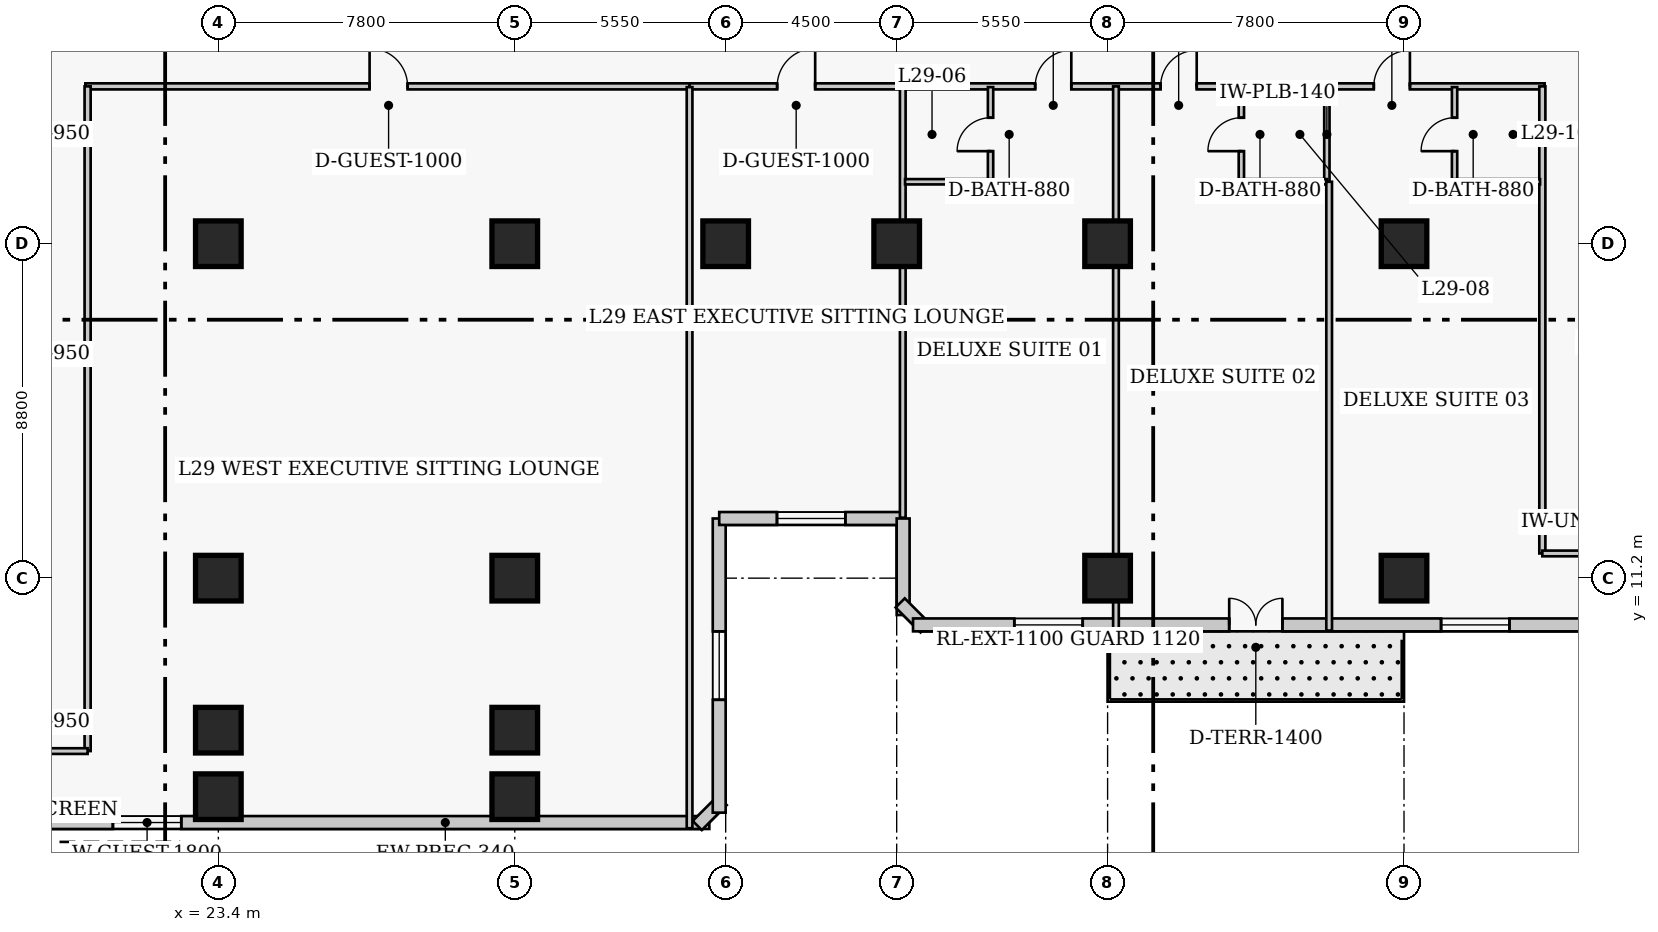
"""IFC4 building model, lengths in metres.
Left out: names, types, materials, properties, quantities, classifications, styles, units other than length and angle.
Written with IfcOpenShell. Run it as: python <this file> out.ifc"""

import sys

from ifc_helpers import new_model, si_unit, direction, frame, frame_2d, origin, origin_2d, place, context, subcontext, project, spatial, rectangle, extrude, element, fill, save


model = new_model("IFC4")
c1 = context("Model", 3, precision=1e-05, world=origin(), true_north=direction((0.0, 1.0)))
c2 = subcontext(c1, "Body", "Model", "MODEL_VIEW")
j1 = project(units=[si_unit("LENGTHUNIT", "METRE"), si_unit("PLANEANGLEUNIT", "RADIAN")], contexts=[c1])
p1 = place(None, origin())
s1 = spatial("IfcSite", under=j1, at=p1, CompositionType="ELEMENT")
p2 = place(p1, origin())
s2 = spatial("IfcBuilding", under=s1, at=p2, CompositionType="ELEMENT")
p3 = place(p2, frame((0.0, 0.0, 118.4)))
s3 = spatial("IfcBuildingStorey", under=s2, at=p3, CompositionType="ELEMENT", Elevation=118.4)
for number, where, z_axis, x_axis in (
    (1, (23.4, 11.2, 0.0), (0.0, 0.0, 1.0), (1.0, 0.0, 0.0)),
    (2, (23.4, 20.0, 0.0), (0.0, 0.0, 1.0), (1.0, 0.0, 0.0)),
    (3, (31.2, 11.2, 0.0), (0.0, 0.0, 1.0), (1.0, 0.0, 0.0)),
    (4, (31.2, 20.0, 0.0), (0.0, 0.0, 1.0), (1.0, 0.0, 0.0)),
    (5, (36.75, 20.0, 0.0), (0.0, 0.0, 1.0), (1.0, 0.0, 0.0)),
    (6, (41.25, 20.0, 0.0), (0.0, 0.0, 1.0), (1.0, 0.0, 0.0)),
    (7, (46.8, 11.2, 0.0), (0.0, 0.0, 1.0), (1.0, 0.0, 0.0)),
    (8, (46.8, 20.0, 0.0), (0.0, 0.0, 1.0), (1.0, 0.0, 0.0)),
    (9, (54.6, 11.2, 0.0), (0.0, 0.0, 1.0), (1.0, 0.0, 0.0)),
    (10, (54.6, 20.0, 0.0), (0.0, 0.0, 1.0), (1.0, 0.0, 0.0)),
    (11, (23.4, 7.2, 0.0), (0.0, 0.0, 1.0), (1.0, 0.0, 0.0)),
    (12, (31.2, 7.2, 0.0), (0.0, 0.0, 1.0), (1.0, 0.0, 0.0)),
    (13, (23.4, 5.45, 0.0), (0.0, 0.0, 1.0), (1.0, 0.0, 0.0)),
    (14, (31.2, 5.45, 0.0), (0.0, 0.0, 1.0), (1.0, 0.0, 0.0)),
):
    element("IfcColumn", number, at=place(p3, frame(where, z_axis=z_axis, x_axis=x_axis)), inside=s3, PredefinedType="COLUMN", context=c2, shape_type="SweptSolid", body=[
        extrude(rectangle(XDim=1.2, YDim=1.2, at=origin_2d()), origin(), (0.0, 0.0, 1.0), 3.8),
    ])
p4 = place(p3, frame((8.03, 4.77, 0.0), z_axis=(0.0, 0.0, 1.0), x_axis=(1.0, 0.0, 0.0)))
e15 = element("IfcWall", 15, at=p4, inside=s3, PredefinedType="SOLIDWALL", context=c2, shape_type="SweptSolid", body=[
    extrude(rectangle(XDim=28.29, YDim=0.34, at=frame_2d((14.145, 0.0))), origin(), (0.0, 0.0, 1.0), 3.54),
])
p5 = place(p4, frame((12.595, 0.0, 0.85)))
e16 = element("IfcOpeningElement", 16, at=p5, cuts=e15, PredefinedType="OPENING", context=c2, shape_type="SweptSolid", body=[
    extrude(rectangle(XDim=1.8, YDim=1.8, at=frame_2d((0.9, 0.9))), frame((0.0, 0.18, 0.0), z_axis=(0.0, -1.0, 0.0), x_axis=(1.0, 0.0, 0.0)), (0.0, 0.0, 1.0), 0.36),
])
p6 = place(p3, frame((36.001, 4.692, 0.0), z_axis=(0.0, 0.0, 1.0), x_axis=(0.707238225886, 0.706975312048, 0.0)))
e17 = element("IfcWall", 17, at=p6, inside=s3, PredefinedType="SOLIDWALL", context=c2, shape_type="SweptSolid", body=[
    extrude(rectangle(XDim=0.929, YDim=0.34, at=frame_2d((0.464, 0.0))), origin(), (0.0, 0.0, 1.0), 3.54),
])
p7 = place(p3, frame((36.58, 5.03, 0.0), z_axis=(0.0, 0.0, 1.0), x_axis=(0.0, 1.0, 0.0)))
e18 = element("IfcWall", 18, at=p7, inside=s3, PredefinedType="SOLIDWALL", context=c2, shape_type="SweptSolid", body=[
    extrude(rectangle(XDim=7.74, YDim=0.34, at=frame_2d((3.87, 0.0))), origin(), (0.0, 0.0, 1.0), 3.54),
])
p8 = place(p7, frame((2.97, 0.0, 0.85)))
e19 = element("IfcOpeningElement", 19, at=p8, cuts=e18, PredefinedType="OPENING", context=c2, shape_type="SweptSolid", body=[
    extrude(rectangle(XDim=1.8, YDim=1.8, at=frame_2d((0.9, 0.9))), frame((0.0, 0.18, 0.0), z_axis=(0.0, -1.0, 0.0), x_axis=(1.0, 0.0, 0.0)), (0.0, 0.0, 1.0), 0.36),
])
p9 = place(p3, frame((36.58, 12.77, 0.0), z_axis=(0.0, 0.0, 1.0), x_axis=(1.0, 0.0, 0.0)))
e20 = element("IfcWall", 20, at=p9, inside=s3, PredefinedType="SOLIDWALL", context=c2, shape_type="SweptSolid", body=[
    extrude(rectangle(XDim=4.84, YDim=0.34, at=frame_2d((2.42, 0.0))), origin(), (0.0, 0.0, 1.0), 3.54),
])
p10 = place(p9, frame((1.52, 0.0, 0.85)))
e21 = element("IfcOpeningElement", 21, at=p10, cuts=e20, PredefinedType="OPENING", context=c2, shape_type="SweptSolid", body=[
    extrude(rectangle(XDim=1.8, YDim=1.8, at=frame_2d((0.9, 0.9))), frame((0.0, 0.18, 0.0), z_axis=(0.0, -1.0, 0.0), x_axis=(1.0, 0.0, 0.0)), (0.0, 0.0, 1.0), 0.36),
])
p11 = place(p3, frame((41.42, 12.77, 0.0), z_axis=(0.0, 0.0, 1.0), x_axis=(0.0, -1.0, 0.0)))
e22 = element("IfcWall", 22, at=p11, inside=s3, PredefinedType="SOLIDWALL", context=c2, shape_type="SweptSolid", body=[
    extrude(rectangle(XDim=2.54, YDim=0.34, at=frame_2d((1.27, 0.0))), origin(), (0.0, 0.0, 1.0), 3.54),
])
p12 = place(p3, frame((41.342, 10.549, 0.0), z_axis=(0.0, 0.0, 1.0), x_axis=(0.707106781187, -0.707106781187, 0.0)))
e23 = element("IfcWall", 23, at=p12, inside=s3, PredefinedType="SOLIDWALL", context=c2, shape_type="SweptSolid", body=[
    extrude(rectangle(XDim=0.929, YDim=0.34, at=frame_2d((0.464, 0.0))), origin(), (0.0, 0.0, 1.0), 3.54),
])
p13 = place(p3, frame((41.68, 9.97, 0.0), z_axis=(0.0, 0.0, 1.0), x_axis=(1.0, 0.0, 0.0)))
e24 = element("IfcWall", 24, at=p13, inside=s3, PredefinedType="SOLIDWALL", context=c2, shape_type="SweptSolid", body=[
    extrude(rectangle(XDim=28.29, YDim=0.34, at=frame_2d((14.145, 0.0))), origin(), (0.0, 0.0, 1.0), 3.54),
])
p14 = place(p13, frame((8.32, 0.0, 0.0)))
e25 = element("IfcOpeningElement", 25, at=p14, cuts=e24, PredefinedType="OPENING", context=c2, shape_type="SweptSolid", body=[
    extrude(rectangle(XDim=1.4, YDim=2.15, at=frame_2d((0.7, 1.075))), frame((0.0, 0.18, 0.0), z_axis=(0.0, -1.0, 0.0), x_axis=(1.0, 0.0, 0.0)), (0.0, 0.0, 1.0), 0.36),
])
p15 = place(p13, frame((2.665, 0.0, 0.85)))
e26 = element("IfcOpeningElement", 26, at=p15, cuts=e24, PredefinedType="OPENING", context=c2, shape_type="SweptSolid", body=[
    extrude(rectangle(XDim=1.8, YDim=1.8, at=frame_2d((0.9, 0.9))), frame((0.0, 0.18, 0.0), z_axis=(0.0, -1.0, 0.0), x_axis=(1.0, 0.0, 0.0)), (0.0, 0.0, 1.0), 0.36),
])
p16 = place(p13, frame((13.895, 0.0, 0.85)))
e27 = element("IfcOpeningElement", 27, at=p16, cuts=e24, PredefinedType="OPENING", context=c2, shape_type="SweptSolid", body=[
    extrude(rectangle(XDim=1.8, YDim=1.8, at=frame_2d((0.9, 0.9))), frame((0.0, 0.18, 0.0), z_axis=(0.0, -1.0, 0.0), x_axis=(1.0, 0.0, 0.0)), (0.0, 0.0, 1.0), 0.36),
])
p17 = place(p3, frame((19.9, 24.14, 0.0), z_axis=(0.0, 0.0, 1.0), x_axis=(1.0, 0.0, 0.0)))
e28 = element("IfcWall", 28, at=p17, inside=s3, PredefinedType="PARTITIONING", context=c2, shape_type="SweptSolid", body=[
    extrude(rectangle(XDim=15.9, YDim=0.16, at=frame_2d((7.95, 0.0))), origin(), (0.0, 0.0, 1.0), 3.54),
])
p18 = place(p17, frame((7.48, 0.0, 0.0)))
e29 = element("IfcOpeningElement", 29, at=p18, cuts=e28, PredefinedType="OPENING", context=c2, shape_type="SweptSolid", body=[
    extrude(rectangle(XDim=1.0, YDim=2.15, at=frame_2d((0.5, 1.075))), frame((0.0, 0.09, 0.0), z_axis=(0.0, -1.0, 0.0), x_axis=(1.0, 0.0, 0.0)), (0.0, 0.0, 1.0), 0.18),
])
p19 = place(p3, frame((35.8, 24.14, 0.0), z_axis=(0.0, 0.0, 1.0), x_axis=(1.0, 0.0, 0.0)))
e30 = element("IfcWall", 30, at=p19, inside=s3, PredefinedType="PARTITIONING", context=c2, shape_type="SweptSolid", body=[
    extrude(rectangle(XDim=22.5, YDim=0.16, at=frame_2d((11.25, 0.0))), origin(), (0.0, 0.0, 1.0), 3.54),
])
p20 = place(p19, frame((2.305, 0.0, 0.0)))
e31 = element("IfcOpeningElement", 31, at=p20, cuts=e30, PredefinedType="OPENING", context=c2, shape_type="SweptSolid", body=[
    extrude(rectangle(XDim=1.0, YDim=2.15, at=frame_2d((0.5, 1.075))), frame((0.0, 0.09, 0.0), z_axis=(0.0, -1.0, 0.0), x_axis=(1.0, 0.0, 0.0)), (0.0, 0.0, 1.0), 0.18),
])
p21 = place(p19, frame((9.095, 0.0, 0.0)))
e32 = element("IfcOpeningElement", 32, at=p21, cuts=e30, PredefinedType="OPENING", context=c2, shape_type="SweptSolid", body=[
    extrude(rectangle(XDim=0.95, YDim=2.1, at=frame_2d((0.475, 1.05))), frame((0.0, 0.09, 0.0), z_axis=(0.0, -1.0, 0.0), x_axis=(1.0, 0.0, 0.0)), (0.0, 0.0, 1.0), 0.18),
])
p22 = place(p19, frame((12.395, 0.0, 0.0)))
e33 = element("IfcOpeningElement", 33, at=p22, cuts=e30, PredefinedType="OPENING", context=c2, shape_type="SweptSolid", body=[
    extrude(rectangle(XDim=0.95, YDim=2.1, at=frame_2d((0.475, 1.05))), frame((0.0, 0.09, 0.0), z_axis=(0.0, -1.0, 0.0), x_axis=(1.0, 0.0, 0.0)), (0.0, 0.0, 1.0), 0.18),
])
p23 = place(p19, frame((18.005, 0.0, 0.0)))
e34 = element("IfcOpeningElement", 34, at=p23, cuts=e30, PredefinedType="OPENING", context=c2, shape_type="SweptSolid", body=[
    extrude(rectangle(XDim=0.95, YDim=2.1, at=frame_2d((0.475, 1.05))), frame((0.0, 0.09, 0.0), z_axis=(0.0, -1.0, 0.0), x_axis=(1.0, 0.0, 0.0)), (0.0, 0.0, 1.0), 0.18),
])
p24 = place(p3, frame((19.96, 6.65, 0.0), z_axis=(0.0, 0.0, 1.0), x_axis=(0.0, 1.0, 0.0)))
e35 = element("IfcWall", 35, at=p24, inside=s3, PredefinedType="PARTITIONING", context=c2, shape_type="SweptSolid", body=[
    extrude(rectangle(XDim=17.49, YDim=0.16, at=frame_2d((8.745, 0.0))), origin(), (0.0, 0.0, 1.0), 3.54),
])
p25 = place(p3, frame((58.24, 11.85, 0.0), z_axis=(0.0, 0.0, 1.0), x_axis=(0.0, 1.0, 0.0)))
e36 = element("IfcWall", 36, at=p25, inside=s3, PredefinedType="PARTITIONING", context=c2, shape_type="SweptSolid", body=[
    extrude(rectangle(XDim=12.29, YDim=0.16, at=frame_2d((6.145, 0.0))), origin(), (0.0, 0.0, 1.0), 3.54),
])
for number, where, z_axis, x_axis in (
    (37, (58.24, 11.85, 0.0), (0.0, 0.0, 1.0), (1.0, 0.0, 0.0)),
    (38, (17.74, 6.65, 0.0), (0.0, 0.0, 1.0), (1.0, 0.0, 0.0)),
):
    element("IfcWall", number, at=place(p3, frame(where, z_axis=z_axis, x_axis=x_axis)), inside=s3, PredefinedType="PARTITIONING", context=c2, shape_type="SweptSolid", body=[
        extrude(rectangle(XDim=2.22, YDim=0.15, at=frame_2d((1.11, 0.0))), origin(), (0.0, 0.0, 1.0), 3.54),
    ])
p26 = place(p3, frame((35.8, 4.62, 0.0), z_axis=(0.0, 0.0, 1.0), x_axis=(0.0, 1.0, 0.0)))
e39 = element("IfcWall", 39, at=p26, inside=s3, PredefinedType="PARTITIONING", context=c2, shape_type="SweptSolid", body=[
    extrude(rectangle(XDim=19.5, YDim=0.15, at=frame_2d((9.75, 0.0))), origin(), (0.0, 0.0, 1.0), 3.54),
])
p27 = place(p3, frame((41.41, 12.79, 0.0), z_axis=(0.0, 0.0, 1.0), x_axis=(0.0, 1.0, 0.0)))
e40 = element("IfcWall", 40, at=p27, inside=s3, PredefinedType="PARTITIONING", context=c2, shape_type="SweptSolid", body=[
    extrude(rectangle(XDim=11.35, YDim=0.15, at=frame_2d((5.675, 0.0))), origin(), (0.0, 0.0, 1.0), 3.54),
])
p28 = place(p3, frame((43.72, 21.63, 0.0), z_axis=(0.0, 0.0, 1.0), x_axis=(0.0, 1.0, 0.0)))
e41 = element("IfcWall", 41, at=p28, inside=s3, PredefinedType="PLUMBINGWALL", context=c2, shape_type="SweptSolid", body=[
    extrude(rectangle(XDim=2.49, YDim=0.14, at=frame_2d((1.245, 0.0))), origin(), (0.0, 0.0, 1.0), 3.54),
])
p29 = place(p28, frame((0.805, 0.0, 0.0)))
e42 = element("IfcOpeningElement", 42, at=p29, cuts=e41, PredefinedType="OPENING", context=c2, shape_type="SweptSolid", body=[
    extrude(rectangle(XDim=0.88, YDim=2.05, at=frame_2d((0.44, 1.025))), frame((0.0, 0.08, 0.0), z_axis=(0.0, -1.0, 0.0), x_axis=(1.0, 0.0, 0.0)), (0.0, 0.0, 1.0), 0.16),
])
p30 = place(p3, frame((41.47, 21.63, 0.0), z_axis=(0.0, 0.0, 1.0), x_axis=(1.0, 0.0, 0.0)))
e43 = element("IfcWall", 43, at=p30, inside=s3, PredefinedType="PLUMBINGWALL", context=c2, shape_type="SweptSolid", body=[
    extrude(rectangle(XDim=2.25, YDim=0.14, at=frame_2d((1.125, 0.0))), origin(), (0.0, 0.0, 1.0), 3.54),
])
p31 = place(p3, frame((47.02, 9.82, 0.0), z_axis=(0.0, 0.0, 1.0), x_axis=(0.0, 1.0, 0.0)))
e44 = element("IfcWall", 44, at=p31, inside=s3, PredefinedType="PARTITIONING", context=c2, shape_type="SweptSolid", body=[
    extrude(rectangle(XDim=14.32, YDim=0.15, at=frame_2d((7.16, 0.0))), origin(), (0.0, 0.0, 1.0), 2.679),
])
p32 = place(p3, frame((50.32, 21.63, 0.0), z_axis=(0.0, 0.0, 1.0), x_axis=(0.0, 1.0, 0.0)))
e45 = element("IfcWall", 45, at=p32, inside=s3, PredefinedType="PLUMBINGWALL", context=c2, shape_type="SweptSolid", body=[
    extrude(rectangle(XDim=2.49, YDim=0.14, at=frame_2d((1.245, 0.0))), origin(), (0.0, 0.0, 1.0), 3.54),
])
p33 = place(p32, frame((0.805, 0.0, 0.0)))
e46 = element("IfcOpeningElement", 46, at=p33, cuts=e45, PredefinedType="OPENING", context=c2, shape_type="SweptSolid", body=[
    extrude(rectangle(XDim=0.88, YDim=2.05, at=frame_2d((0.44, 1.025))), frame((0.0, 0.08, 0.0), z_axis=(0.0, -1.0, 0.0), x_axis=(1.0, 0.0, 0.0)), (0.0, 0.0, 1.0), 0.16),
])
p34 = place(p3, frame((52.57, 21.63, 0.0), z_axis=(0.0, 0.0, 1.0), x_axis=(0.0, 1.0, 0.0)))
e47 = element("IfcWall", 47, at=p34, inside=s3, PredefinedType="PLUMBINGWALL", context=c2, shape_type="SweptSolid", body=[
    extrude(rectangle(XDim=2.49, YDim=0.14, at=frame_2d((1.245, 0.0))), origin(), (0.0, 0.0, 1.0), 3.54),
])
p35 = place(p3, frame((50.32, 21.63, 0.0), z_axis=(0.0, 0.0, 1.0), x_axis=(1.0, 0.0, 0.0)))
e48 = element("IfcWall", 48, at=p35, inside=s3, PredefinedType="PLUMBINGWALL", context=c2, shape_type="SweptSolid", body=[
    extrude(rectangle(XDim=2.25, YDim=0.14, at=frame_2d((1.125, 0.0))), origin(), (0.0, 0.0, 1.0), 3.54),
])
p36 = place(p3, frame((52.63, 9.82, 0.0), z_axis=(0.0, 0.0, 1.0), x_axis=(0.0, 1.0, 0.0)))
e49 = element("IfcWall", 49, at=p36, inside=s3, PredefinedType="PARTITIONING", context=c2, shape_type="SweptSolid", body=[
    extrude(rectangle(XDim=11.81, YDim=0.15, at=frame_2d((5.905, 0.0))), origin(), (0.0, 0.0, 1.0), 3.54),
])
p37 = place(p3, frame((55.93, 21.63, 0.0), z_axis=(0.0, 0.0, 1.0), x_axis=(0.0, 1.0, 0.0)))
e50 = element("IfcWall", 50, at=p37, inside=s3, PredefinedType="PLUMBINGWALL", context=c2, shape_type="SweptSolid", body=[
    extrude(rectangle(XDim=2.49, YDim=0.14, at=frame_2d((1.245, 0.0))), origin(), (0.0, 0.0, 1.0), 3.54),
])
p38 = place(p37, frame((0.805, 0.0, 0.0)))
e51 = element("IfcOpeningElement", 51, at=p38, cuts=e50, PredefinedType="OPENING", context=c2, shape_type="SweptSolid", body=[
    extrude(rectangle(XDim=0.88, YDim=2.05, at=frame_2d((0.44, 1.025))), frame((0.0, 0.08, 0.0), z_axis=(0.0, -1.0, 0.0), x_axis=(1.0, 0.0, 0.0)), (0.0, 0.0, 1.0), 0.16),
])
p39 = place(p3, frame((55.93, 21.63, 0.0), z_axis=(0.0, 0.0, 1.0), x_axis=(1.0, 0.0, 0.0)))
e52 = element("IfcWall", 52, at=p39, inside=s3, PredefinedType="PLUMBINGWALL", context=c2, shape_type="SweptSolid", body=[
    extrude(rectangle(XDim=2.25, YDim=0.14, at=frame_2d((1.125, 0.0))), origin(), (0.0, 0.0, 1.0), 3.54),
])
p40 = place(p5, origin())
e53 = element("IfcWindow", 53, at=p40, inside=s3, PartitioningType="SINGLE_PANEL", PredefinedType="WINDOW", context=c2, shape_type="SweptSolid", body=[
    extrude(rectangle(XDim=1.8, YDim=1.8, at=frame_2d((0.9, 0.9))), frame((0.0, 0.03, 0.0), z_axis=(0.0, -1.0, 0.0), x_axis=(1.0, 0.0, 0.0)), (0.0, 0.0, 1.0), 0.06),
])
fill(e16, e53)
p41 = place(p8, origin())
e54 = element("IfcWindow", 54, at=p41, inside=s3, PartitioningType="SINGLE_PANEL", PredefinedType="WINDOW", context=c2, shape_type="SweptSolid", body=[
    extrude(rectangle(XDim=1.8, YDim=1.8, at=frame_2d((0.9, 0.9))), frame((0.0, 0.03, 0.0), z_axis=(0.0, -1.0, 0.0), x_axis=(1.0, 0.0, 0.0)), (0.0, 0.0, 1.0), 0.06),
])
fill(e19, e54)
p42 = place(p10, origin())
e55 = element("IfcWindow", 55, at=p42, inside=s3, PartitioningType="SINGLE_PANEL", PredefinedType="WINDOW", context=c2, shape_type="SweptSolid", body=[
    extrude(rectangle(XDim=1.8, YDim=1.8, at=frame_2d((0.9, 0.9))), frame((0.0, 0.03, 0.0), z_axis=(0.0, -1.0, 0.0), x_axis=(1.0, 0.0, 0.0)), (0.0, 0.0, 1.0), 0.06),
])
fill(e21, e55)
p43 = place(p14, origin())
e56 = element("IfcDoor", 56, at=p43, inside=s3, OperationType="DOUBLE_DOOR_SINGLE_SWING", PredefinedType="DOOR", context=c2, shape_type="SweptSolid", body=[
    extrude(rectangle(XDim=1.4, YDim=2.15, at=frame_2d((0.7, 1.075))), frame((0.0, 0.025, 0.0), z_axis=(0.0, -1.0, 0.0), x_axis=(1.0, 0.0, 0.0)), (0.0, 0.0, 1.0), 0.05),
])
fill(e25, e56)
p44 = place(p15, origin())
e57 = element("IfcWindow", 57, at=p44, inside=s3, PartitioningType="SINGLE_PANEL", PredefinedType="WINDOW", context=c2, shape_type="SweptSolid", body=[
    extrude(rectangle(XDim=1.8, YDim=1.8, at=frame_2d((0.9, 0.9))), frame((0.0, 0.03, 0.0), z_axis=(0.0, -1.0, 0.0), x_axis=(1.0, 0.0, 0.0)), (0.0, 0.0, 1.0), 0.06),
])
fill(e26, e57)
p45 = place(p16, origin())
e58 = element("IfcWindow", 58, at=p45, inside=s3, PartitioningType="SINGLE_PANEL", PredefinedType="WINDOW", context=c2, shape_type="SweptSolid", body=[
    extrude(rectangle(XDim=1.8, YDim=1.8, at=frame_2d((0.9, 0.9))), frame((0.0, 0.03, 0.0), z_axis=(0.0, -1.0, 0.0), x_axis=(1.0, 0.0, 0.0)), (0.0, 0.0, 1.0), 0.06),
])
fill(e27, e58)
p46 = place(p18, origin())
e59 = element("IfcDoor", 59, at=p46, inside=s3, OperationType="SINGLE_SWING_LEFT", PredefinedType="DOOR", context=c2, shape_type="SweptSolid", body=[
    extrude(rectangle(XDim=1.0, YDim=2.15, at=frame_2d((0.5, 1.075))), frame((0.0, 0.025, 0.0), z_axis=(0.0, -1.0, 0.0), x_axis=(1.0, 0.0, 0.0)), (0.0, 0.0, 1.0), 0.05),
])
fill(e29, e59)
p47 = place(p20, origin())
e60 = element("IfcDoor", 60, at=p47, inside=s3, OperationType="SINGLE_SWING_RIGHT", PredefinedType="DOOR", context=c2, shape_type="SweptSolid", body=[
    extrude(rectangle(XDim=1.0, YDim=2.15, at=frame_2d((0.5, 1.075))), frame((0.0, 0.025, 0.0), z_axis=(0.0, -1.0, 0.0), x_axis=(1.0, 0.0, 0.0)), (0.0, 0.0, 1.0), 0.05),
])
fill(e31, e60)
p48 = place(p29, origin())
e61 = element("IfcDoor", 61, at=p48, inside=s3, OperationType="SINGLE_SWING_LEFT", PredefinedType="DOOR", context=c2, shape_type="SweptSolid", body=[
    extrude(rectangle(XDim=0.88, YDim=2.05, at=frame_2d((0.44, 1.025))), frame((0.0, 0.025, 0.0), z_axis=(0.0, -1.0, 0.0), x_axis=(1.0, 0.0, 0.0)), (0.0, 0.0, 1.0), 0.05),
])
fill(e42, e61)
p49 = place(p21, origin())
e62 = element("IfcDoor", 62, at=p49, inside=s3, OperationType="SINGLE_SWING_RIGHT", PredefinedType="DOOR", context=c2, shape_type="SweptSolid", body=[
    extrude(rectangle(XDim=0.95, YDim=2.1, at=frame_2d((0.475, 1.05))), frame((0.0, 0.025, 0.0), z_axis=(0.0, -1.0, 0.0), x_axis=(1.0, 0.0, 0.0)), (0.0, 0.0, 1.0), 0.05),
])
fill(e32, e62)
p50 = place(p33, origin())
e63 = element("IfcDoor", 63, at=p50, inside=s3, OperationType="SINGLE_SWING_LEFT", PredefinedType="DOOR", context=c2, shape_type="SweptSolid", body=[
    extrude(rectangle(XDim=0.88, YDim=2.05, at=frame_2d((0.44, 1.025))), frame((0.0, 0.025, 0.0), z_axis=(0.0, -1.0, 0.0), x_axis=(1.0, 0.0, 0.0)), (0.0, 0.0, 1.0), 0.05),
])
fill(e46, e63)
p51 = place(p22, origin())
e64 = element("IfcDoor", 64, at=p51, inside=s3, OperationType="SINGLE_SWING_RIGHT", PredefinedType="DOOR", context=c2, shape_type="SweptSolid", body=[
    extrude(rectangle(XDim=0.95, YDim=2.1, at=frame_2d((0.475, 1.05))), frame((0.0, 0.025, 0.0), z_axis=(0.0, -1.0, 0.0), x_axis=(1.0, 0.0, 0.0)), (0.0, 0.0, 1.0), 0.05),
])
fill(e33, e64)
p52 = place(p38, origin())
e65 = element("IfcDoor", 65, at=p52, inside=s3, OperationType="SINGLE_SWING_LEFT", PredefinedType="DOOR", context=c2, shape_type="SweptSolid", body=[
    extrude(rectangle(XDim=0.88, YDim=2.05, at=frame_2d((0.44, 1.025))), frame((0.0, 0.025, 0.0), z_axis=(0.0, -1.0, 0.0), x_axis=(1.0, 0.0, 0.0)), (0.0, 0.0, 1.0), 0.05),
])
fill(e51, e65)
p53 = place(p23, origin())
e66 = element("IfcDoor", 66, at=p53, inside=s3, OperationType="SINGLE_SWING_RIGHT", PredefinedType="DOOR", context=c2, shape_type="SweptSolid", body=[
    extrude(rectangle(XDim=0.95, YDim=2.1, at=frame_2d((0.475, 1.05))), frame((0.0, 0.025, 0.0), z_axis=(0.0, -1.0, 0.0), x_axis=(1.0, 0.0, 0.0)), (0.0, 0.0, 1.0), 0.05),
])
fill(e34, e66)
save(model, sys.argv[1])
